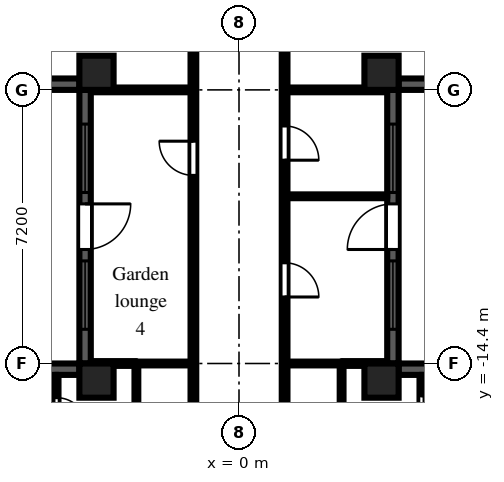
"""IFC4 building model, lengths in metres.
Left out: names, types, materials, properties, quantities, classifications, styles, units other than length and angle.
Written with IfcOpenShell. Run it as: python <this file> out.ifc"""

import sys

from ifc_helpers import new_model, si_unit, direction, frame, frame_2d, origin, origin_2d, place, context, subcontext, project, spatial, rectangle, extrude, element, fill, save


model = new_model("IFC4")
c1 = context("Model", 3, precision=1e-05, world=origin(), true_north=direction((0.0, 1.0)))
c2 = subcontext(c1, "Body", "Model", "MODEL_VIEW")
j1 = project(units=[si_unit("LENGTHUNIT", "METRE"), si_unit("PLANEANGLEUNIT", "RADIAN")], contexts=[c1])
p1 = place(None, origin())
s1 = spatial("IfcSite", under=j1, at=p1, CompositionType="ELEMENT")
p2 = place(p1, origin())
s2 = spatial("IfcBuilding", under=s1, at=p2, CompositionType="ELEMENT")
p3 = place(p2, frame((0.0, 0.0, 93.9)))
s3 = spatial("IfcBuildingStorey", under=s2, at=p3, CompositionType="ELEMENT", Elevation=93.9)
for number, where, z_axis, x_axis in (
    (1, (-3.75, -14.85, 0.0), (0.0, 0.0, 1.0), (1.0, 0.0, 0.0)),
    (2, (-3.75, -6.75, 0.0), (0.0, 0.0, 1.0), (1.0, 0.0, 0.0)),
    (3, (3.75, -14.85, 0.0), (0.0, 0.0, 1.0), (1.0, 0.0, 0.0)),
    (4, (3.75, -6.75, 0.0), (0.0, 0.0, 1.0), (1.0, 0.0, 0.0)),
):
    element("IfcColumn", number, at=place(p3, frame(where, z_axis=z_axis, x_axis=x_axis)), inside=s3, PredefinedType="COLUMN", context=c2, shape_type="SweptSolid", body=[
        extrude(rectangle(XDim=0.9, YDim=0.9, at=origin_2d()), origin(), (0.0, 0.0, 1.0), 3.0),
    ])
p4 = place(p3, frame((-7.2, -7.05, 0.0), z_axis=(0.0, 0.0, 1.0), x_axis=(1.0, 0.0, 0.0)))
e5 = element("IfcWall", 5, at=p4, inside=s3, PredefinedType="SOLIDWALL", context=c2, shape_type="SweptSolid", body=[
    extrude(rectangle(XDim=3.0, YDim=0.3, at=frame_2d((1.5, 0.0))), origin(), (0.0, 0.0, 1.0), 2.1),
])
p5 = place(p3, frame((-4.05, -7.2, 0.0), z_axis=(0.0, 0.0, 1.0), x_axis=(0.0, -1.0, 0.0)))
e6 = element("IfcWall", 6, at=p5, inside=s3, PredefinedType="SOLIDWALL", context=c2, shape_type="SweptSolid", body=[
    extrude(rectangle(XDim=7.2, YDim=0.3, at=frame_2d((3.6, 0.0))), origin(), (0.0, 0.0, 1.0), 2.1),
])
p6 = place(p5, frame((3.0, 0.0, 0.0)))
e7 = element("IfcOpeningElement", 7, at=p6, cuts=e6, PredefinedType="OPENING", context=c2, shape_type="SweptSolid", body=[
    extrude(rectangle(XDim=1.2, YDim=2.05, at=frame_2d((0.6, 1.025))), frame((0.0, 0.16, 0.0), z_axis=(0.0, -1.0, 0.0), x_axis=(1.0, 0.0, 0.0)), (0.0, 0.0, 1.0), 0.32),
])
p7 = place(p5, frame((0.9, 0.0, 0.2)))
e8 = element("IfcOpeningElement", 8, at=p7, cuts=e6, PredefinedType="OPENING", context=c2, shape_type="SweptSolid", body=[
    extrude(rectangle(XDim=1.8, YDim=1.85, at=frame_2d((0.9, 0.925))), frame((0.0, 0.16, 0.0), z_axis=(0.0, -1.0, 0.0), x_axis=(1.0, 0.0, 0.0)), (0.0, 0.0, 1.0), 0.32),
])
p8 = place(p5, frame((4.5, 0.0, 0.2)))
e9 = element("IfcOpeningElement", 9, at=p8, cuts=e6, PredefinedType="OPENING", context=c2, shape_type="SweptSolid", body=[
    extrude(rectangle(XDim=1.8, YDim=1.85, at=frame_2d((0.9, 0.925))), frame((0.0, 0.16, 0.0), z_axis=(0.0, -1.0, 0.0), x_axis=(1.0, 0.0, 0.0)), (0.0, 0.0, 1.0), 0.32),
])
for number, where, z_axis, x_axis in (
    (10, (-4.2, -14.55, 0.0), (0.0, 0.0, 1.0), (-1.0, 0.0, 0.0)),
    (11, (6.3, -14.55, 0.0), (0.0, 0.0, 1.0), (-1.0, 0.0, 0.0)),
):
    element("IfcWall", number, at=place(p3, frame(where, z_axis=z_axis, x_axis=x_axis)), inside=s3, PredefinedType="SOLIDWALL", context=c2, shape_type="SweptSolid", body=[
        extrude(rectangle(XDim=2.1, YDim=0.3, at=frame_2d((1.05, 0.0))), origin(), (0.0, 0.0, 1.0), 2.1),
    ])
p9 = place(p3, frame((4.05, -14.4, 0.0), z_axis=(0.0, 0.0, 1.0), x_axis=(0.0, 1.0, 0.0)))
e12 = element("IfcWall", 12, at=p9, inside=s3, PredefinedType="SOLIDWALL", context=c2, shape_type="SweptSolid", body=[
    extrude(rectangle(XDim=7.2, YDim=0.3, at=frame_2d((3.6, 0.0))), origin(), (0.0, 0.0, 1.0), 2.1),
])
p10 = place(p9, frame((3.0, 0.0, 0.0)))
e13 = element("IfcOpeningElement", 13, at=p10, cuts=e12, PredefinedType="OPENING", context=c2, shape_type="SweptSolid", body=[
    extrude(rectangle(XDim=1.2, YDim=2.05, at=frame_2d((0.6, 1.025))), frame((0.0, 0.16, 0.0), z_axis=(0.0, -1.0, 0.0), x_axis=(1.0, 0.0, 0.0)), (0.0, 0.0, 1.0), 0.32),
])
p11 = place(p9, frame((0.9, 0.0, 0.2)))
e14 = element("IfcOpeningElement", 14, at=p11, cuts=e12, PredefinedType="OPENING", context=c2, shape_type="SweptSolid", body=[
    extrude(rectangle(XDim=1.8, YDim=1.85, at=frame_2d((0.9, 0.925))), frame((0.0, 0.16, 0.0), z_axis=(0.0, -1.0, 0.0), x_axis=(1.0, 0.0, 0.0)), (0.0, 0.0, 1.0), 0.32),
])
p12 = place(p9, frame((4.5, 0.0, 0.2)))
e15 = element("IfcOpeningElement", 15, at=p12, cuts=e12, PredefinedType="OPENING", context=c2, shape_type="SweptSolid", body=[
    extrude(rectangle(XDim=1.8, YDim=1.85, at=frame_2d((0.9, 0.925))), frame((0.0, 0.16, 0.0), z_axis=(0.0, -1.0, 0.0), x_axis=(1.0, 0.0, 0.0)), (0.0, 0.0, 1.0), 0.32),
])
p13 = place(p3, frame((4.2, -7.05, 0.0), z_axis=(0.0, 0.0, 1.0), x_axis=(1.0, 0.0, 0.0)))
e16 = element("IfcWall", 16, at=p13, inside=s3, PredefinedType="SOLIDWALL", context=c2, shape_type="SweptSolid", body=[
    extrude(rectangle(XDim=3.0, YDim=0.3, at=frame_2d((1.5, 0.0))), origin(), (0.0, 0.0, 1.0), 2.1),
])
p14 = place(p3, frame((-4.8, -16.25, 0.0), z_axis=(0.0, 0.0, 1.0), x_axis=(0.0, 1.0, 0.0)))
e17 = element("IfcWall", 17, at=p14, inside=s3, PredefinedType="PARTITIONING", context=c2, shape_type="SweptSolid", body=[
    extrude(rectangle(XDim=1.55, YDim=0.1, at=frame_2d((0.775, 0.0))), origin(), (0.0, 0.0, 1.0), 2.575),
])
p15 = place(p14, frame((0.15, 0.0, 0.0)))
e18 = element("IfcOpeningElement", 18, at=p15, cuts=e17, PredefinedType="OPENING", context=c2, shape_type="SweptSolid", body=[
    extrude(rectangle(XDim=0.8, YDim=2.1, at=frame_2d((0.4, 1.05))), frame((0.0, 0.06, 0.0), z_axis=(0.0, -1.0, 0.0), x_axis=(1.0, 0.0, 0.0)), (0.0, 0.0, 1.0), 0.12),
])
p16 = place(p3, frame((-3.9, -14.4, 0.0), z_axis=(0.0, 0.0, 1.0), x_axis=(1.0, 0.0, 0.0)))
e19 = element("IfcWall", 19, at=p16, inside=s3, PredefinedType="PARTITIONING", context=c2, shape_type="SweptSolid", body=[
    extrude(rectangle(XDim=1.2, YDim=0.125, at=frame_2d((0.6, 0.0))), origin(), (0.0, 0.0, 1.0), 2.575),
])
p17 = place(p3, frame((-3.9, -7.2, 0.0), z_axis=(0.0, 0.0, 1.0), x_axis=(1.0, 0.0, 0.0)))
e20 = element("IfcWall", 20, at=p17, inside=s3, PredefinedType="PARTITIONING", context=c2, shape_type="SweptSolid", body=[
    extrude(rectangle(XDim=2.625, YDim=0.125, at=frame_2d((1.312, 0.0))), origin(), (0.0, 0.0, 1.0), 2.575),
])
p18 = place(p3, frame((-2.7, -32.35, 0.0), z_axis=(0.0, 0.0, 1.0), x_axis=(0.0, 1.0, 0.0)))
e21 = element("IfcWall", 21, at=p18, inside=s3, PredefinedType="PARTITIONING", context=c2, shape_type="SweptSolid", body=[
    extrude(rectangle(XDim=17.888, YDim=0.1, at=frame_2d((8.944, 0.0))), origin(), (0.0, 0.0, 1.0), 2.575),
])
p19 = place(p18, frame((2.2, 0.0, 0.0)))
e22 = element("IfcOpeningElement", 22, at=p19, cuts=e21, PredefinedType="OPENING", context=c2, shape_type="SweptSolid", body=[
    extrude(rectangle(XDim=0.9, YDim=2.1, at=frame_2d((0.45, 1.05))), frame((0.0, 0.06, 0.0), z_axis=(0.0, -1.0, 0.0), x_axis=(1.0, 0.0, 0.0)), (0.0, 0.0, 1.0), 0.12),
])
p20 = place(p18, frame((4.0, 0.0, 0.0)))
e23 = element("IfcOpeningElement", 23, at=p20, cuts=e21, PredefinedType="OPENING", context=c2, shape_type="SweptSolid", body=[
    extrude(rectangle(XDim=0.9, YDim=2.1, at=frame_2d((0.45, 1.05))), frame((0.0, 0.06, 0.0), z_axis=(0.0, -1.0, 0.0), x_axis=(1.0, 0.0, 0.0)), (0.0, 0.0, 1.0), 0.12),
])
p21 = place(p18, frame((9.4, 0.0, 0.0)))
e24 = element("IfcOpeningElement", 24, at=p21, cuts=e21, PredefinedType="OPENING", context=c2, shape_type="SweptSolid", body=[
    extrude(rectangle(XDim=0.9, YDim=2.1, at=frame_2d((0.45, 1.05))), frame((0.0, 0.06, 0.0), z_axis=(0.0, -1.0, 0.0), x_axis=(1.0, 0.0, 0.0)), (0.0, 0.0, 1.0), 0.12),
])
p22 = place(p18, frame((11.2, 0.0, 0.0)))
e25 = element("IfcOpeningElement", 25, at=p22, cuts=e21, PredefinedType="OPENING", context=c2, shape_type="SweptSolid", body=[
    extrude(rectangle(XDim=0.9, YDim=2.1, at=frame_2d((0.45, 1.05))), frame((0.0, 0.06, 0.0), z_axis=(0.0, -1.0, 0.0), x_axis=(1.0, 0.0, 0.0)), (0.0, 0.0, 1.0), 0.12),
])
p23 = place(p18, frame((14.8, 0.0, 0.0)))
e26 = element("IfcOpeningElement", 26, at=p23, cuts=e21, PredefinedType="OPENING", context=c2, shape_type="SweptSolid", body=[
    extrude(rectangle(XDim=0.9, YDim=2.1, at=frame_2d((0.45, 1.05))), frame((0.0, 0.06, 0.0), z_axis=(0.0, -1.0, 0.0), x_axis=(1.0, 0.0, 0.0)), (0.0, 0.0, 1.0), 0.12),
])
p24 = place(p3, frame((-2.7, -14.4, 0.0), z_axis=(0.0, 0.0, 1.0), x_axis=(1.0, 0.0, 0.0)))
e27 = element("IfcWall", 27, at=p24, inside=s3, PredefinedType="PARTITIONING", context=c2, shape_type="SweptSolid", body=[
    extrude(rectangle(XDim=1.425, YDim=0.1, at=frame_2d((0.712, 0.0))), origin(), (0.0, 0.0, 1.0), 2.575),
])
p25 = place(p3, frame((-1.2, -36.5, 0.0), z_axis=(0.0, 0.0, 1.0), x_axis=(0.0, 1.0, 0.0)))
e28 = element("IfcWall", 28, at=p25, inside=s3, PredefinedType="PARTITIONING", context=c2, shape_type="SweptSolid", body=[
    extrude(rectangle(XDim=35.225, YDim=0.15, at=frame_2d((17.613, 0.0))), origin(), (0.0, 0.0, 1.0), 2.575),
])
p26 = place(p25, frame((31.85, 0.0, 0.0)))
e29 = element("IfcOpeningElement", 29, at=p26, cuts=e28, PredefinedType="OPENING", context=c2, shape_type="SweptSolid", body=[
    extrude(rectangle(XDim=0.9, YDim=2.1, at=frame_2d((0.45, 1.05))), frame((0.0, 0.085, 0.0), z_axis=(0.0, -1.0, 0.0), x_axis=(1.0, 0.0, 0.0)), (0.0, 0.0, 1.0), 0.17),
])
p27 = place(p25, frame((27.05, 0.0, 0.0)))
e30 = element("IfcOpeningElement", 30, at=p27, cuts=e28, PredefinedType="OPENING", context=c2, shape_type="SweptSolid", body=[
    extrude(rectangle(XDim=0.9, YDim=2.1, at=frame_2d((0.45, 1.05))), frame((0.0, 0.085, 0.0), z_axis=(0.0, -1.0, 0.0), x_axis=(1.0, 0.0, 0.0)), (0.0, 0.0, 1.0), 0.17),
])
p28 = place(p25, frame((1.55, 0.0, 0.0)))
e31 = element("IfcOpeningElement", 31, at=p28, cuts=e28, PredefinedType="OPENING", context=c2, shape_type="SweptSolid", body=[
    extrude(rectangle(XDim=1.0, YDim=2.1, at=frame_2d((0.5, 1.05))), frame((0.0, 0.085, 0.0), z_axis=(0.0, -1.0, 0.0), x_axis=(1.0, 0.0, 0.0)), (0.0, 0.0, 1.0), 0.17),
])
p29 = place(p3, frame((1.2, -36.5, 0.0), z_axis=(0.0, 0.0, 1.0), x_axis=(0.0, 1.0, 0.0)))
e32 = element("IfcWall", 32, at=p29, inside=s3, PredefinedType="PARTITIONING", context=c2, shape_type="SweptSolid", body=[
    extrude(rectangle(XDim=35.375, YDim=0.15, at=frame_2d((17.688, 0.0))), origin(), (0.0, 0.0, 1.0), 2.575),
])
p30 = place(p29, frame((33.65, 0.0, 0.0)))
e33 = element("IfcOpeningElement", 33, at=p30, cuts=e32, PredefinedType="OPENING", context=c2, shape_type="SweptSolid", body=[
    extrude(rectangle(XDim=0.9, YDim=2.1, at=frame_2d((0.45, 1.05))), frame((0.0, 0.085, 0.0), z_axis=(0.0, -1.0, 0.0), x_axis=(1.0, 0.0, 0.0)), (0.0, 0.0, 1.0), 0.17),
])
p31 = place(p29, frame((30.65, 0.0, 0.0)))
e34 = element("IfcOpeningElement", 34, at=p31, cuts=e32, PredefinedType="OPENING", context=c2, shape_type="SweptSolid", body=[
    extrude(rectangle(XDim=0.9, YDim=2.1, at=frame_2d((0.45, 1.05))), frame((0.0, 0.085, 0.0), z_axis=(0.0, -1.0, 0.0), x_axis=(1.0, 0.0, 0.0)), (0.0, 0.0, 1.0), 0.17),
])
p32 = place(p29, frame((27.45, 0.0, 0.0)))
e35 = element("IfcOpeningElement", 35, at=p32, cuts=e32, PredefinedType="OPENING", context=c2, shape_type="SweptSolid", body=[
    extrude(rectangle(XDim=0.9, YDim=2.1, at=frame_2d((0.45, 1.05))), frame((0.0, 0.085, 0.0), z_axis=(0.0, -1.0, 0.0), x_axis=(1.0, 0.0, 0.0)), (0.0, 0.0, 1.0), 0.17),
])
p33 = place(p29, frame((23.85, 0.0, 0.0)))
e36 = element("IfcOpeningElement", 36, at=p33, cuts=e32, PredefinedType="OPENING", context=c2, shape_type="SweptSolid", body=[
    extrude(rectangle(XDim=0.9, YDim=2.1, at=frame_2d((0.45, 1.05))), frame((0.0, 0.085, 0.0), z_axis=(0.0, -1.0, 0.0), x_axis=(1.0, 0.0, 0.0)), (0.0, 0.0, 1.0), 0.17),
])
p34 = place(p29, frame((1.55, 0.0, 0.0)))
e37 = element("IfcOpeningElement", 37, at=p34, cuts=e32, PredefinedType="OPENING", context=c2, shape_type="SweptSolid", body=[
    extrude(rectangle(XDim=1.0, YDim=2.1, at=frame_2d((0.5, 1.05))), frame((0.0, 0.085, 0.0), z_axis=(0.0, -1.0, 0.0), x_axis=(1.0, 0.0, 0.0)), (0.0, 0.0, 1.0), 0.17),
])
p35 = place(p3, frame((1.275, -14.4, 0.0), z_axis=(0.0, 0.0, 1.0), x_axis=(1.0, 0.0, 0.0)))
e38 = element("IfcWall", 38, at=p35, inside=s3, PredefinedType="PARTITIONING", context=c2, shape_type="SweptSolid", body=[
    extrude(rectangle(XDim=1.425, YDim=0.1, at=frame_2d((0.712, 0.0))), origin(), (0.0, 0.0, 1.0), 2.575),
])
p36 = place(p3, frame((1.275, -10.0, 0.0), z_axis=(0.0, 0.0, 1.0), x_axis=(1.0, 0.0, 0.0)))
e39 = element("IfcWall", 39, at=p36, inside=s3, PredefinedType="PARTITIONING", context=c2, shape_type="SweptSolid", body=[
    extrude(rectangle(XDim=2.625, YDim=0.1, at=frame_2d((1.312, 0.0))), origin(), (0.0, 0.0, 1.0), 2.575),
])
p37 = place(p3, frame((1.275, -7.2, 0.0), z_axis=(0.0, 0.0, 1.0), x_axis=(1.0, 0.0, 0.0)))
e40 = element("IfcWall", 40, at=p37, inside=s3, PredefinedType="PARTITIONING", context=c2, shape_type="SweptSolid", body=[
    extrude(rectangle(XDim=2.625, YDim=0.125, at=frame_2d((1.312, 0.0))), origin(), (0.0, 0.0, 1.0), 2.575),
])
p38 = place(p3, frame((2.7, -32.35, 0.0), z_axis=(0.0, 0.0, 1.0), x_axis=(0.0, 1.0, 0.0)))
e41 = element("IfcWall", 41, at=p38, inside=s3, PredefinedType="PARTITIONING", context=c2, shape_type="SweptSolid", body=[
    extrude(rectangle(XDim=17.888, YDim=0.1, at=frame_2d((8.944, 0.0))), origin(), (0.0, 0.0, 1.0), 2.575),
])
p39 = place(p38, frame((2.2, 0.0, 0.0)))
e42 = element("IfcOpeningElement", 42, at=p39, cuts=e41, PredefinedType="OPENING", context=c2, shape_type="SweptSolid", body=[
    extrude(rectangle(XDim=0.9, YDim=2.1, at=frame_2d((0.45, 1.05))), frame((0.0, 0.06, 0.0), z_axis=(0.0, -1.0, 0.0), x_axis=(1.0, 0.0, 0.0)), (0.0, 0.0, 1.0), 0.12),
])
p40 = place(p38, frame((4.0, 0.0, 0.0)))
e43 = element("IfcOpeningElement", 43, at=p40, cuts=e41, PredefinedType="OPENING", context=c2, shape_type="SweptSolid", body=[
    extrude(rectangle(XDim=0.9, YDim=2.1, at=frame_2d((0.45, 1.05))), frame((0.0, 0.06, 0.0), z_axis=(0.0, -1.0, 0.0), x_axis=(1.0, 0.0, 0.0)), (0.0, 0.0, 1.0), 0.12),
])
p41 = place(p38, frame((9.4, 0.0, 0.0)))
e44 = element("IfcOpeningElement", 44, at=p41, cuts=e41, PredefinedType="OPENING", context=c2, shape_type="SweptSolid", body=[
    extrude(rectangle(XDim=0.9, YDim=2.1, at=frame_2d((0.45, 1.05))), frame((0.0, 0.06, 0.0), z_axis=(0.0, -1.0, 0.0), x_axis=(1.0, 0.0, 0.0)), (0.0, 0.0, 1.0), 0.12),
])
p42 = place(p38, frame((11.2, 0.0, 0.0)))
e45 = element("IfcOpeningElement", 45, at=p42, cuts=e41, PredefinedType="OPENING", context=c2, shape_type="SweptSolid", body=[
    extrude(rectangle(XDim=0.9, YDim=2.1, at=frame_2d((0.45, 1.05))), frame((0.0, 0.06, 0.0), z_axis=(0.0, -1.0, 0.0), x_axis=(1.0, 0.0, 0.0)), (0.0, 0.0, 1.0), 0.12),
])
p43 = place(p38, frame((14.8, 0.0, 0.0)))
e46 = element("IfcOpeningElement", 46, at=p43, cuts=e41, PredefinedType="OPENING", context=c2, shape_type="SweptSolid", body=[
    extrude(rectangle(XDim=0.9, YDim=2.1, at=frame_2d((0.45, 1.05))), frame((0.0, 0.06, 0.0), z_axis=(0.0, -1.0, 0.0), x_axis=(1.0, 0.0, 0.0)), (0.0, 0.0, 1.0), 0.12),
])
p44 = place(p3, frame((2.7, -14.4, 0.0), z_axis=(0.0, 0.0, 1.0), x_axis=(1.0, 0.0, 0.0)))
e47 = element("IfcWall", 47, at=p44, inside=s3, PredefinedType="PARTITIONING", context=c2, shape_type="SweptSolid", body=[
    extrude(rectangle(XDim=1.2, YDim=0.125, at=frame_2d((0.6, 0.0))), origin(), (0.0, 0.0, 1.0), 2.575),
])
p45 = place(p3, frame((4.8, -16.15, 0.0), z_axis=(0.0, 0.0, 1.0), x_axis=(0.0, 1.0, 0.0)))
e48 = element("IfcWall", 48, at=p45, inside=s3, PredefinedType="PARTITIONING", context=c2, shape_type="SweptSolid", body=[
    extrude(rectangle(XDim=1.45, YDim=0.1, at=frame_2d((0.725, 0.0))), origin(), (0.0, 0.0, 1.0), 2.575),
])
p46 = place(p45, frame((0.1, 0.0, 0.0)))
e49 = element("IfcOpeningElement", 49, at=p46, cuts=e48, PredefinedType="OPENING", context=c2, shape_type="SweptSolid", body=[
    extrude(rectangle(XDim=0.8, YDim=2.1, at=frame_2d((0.4, 1.05))), frame((0.0, 0.06, 0.0), z_axis=(0.0, -1.0, 0.0), x_axis=(1.0, 0.0, 0.0)), (0.0, 0.0, 1.0), 0.12),
])
p47 = place(p6, origin())
e50 = element("IfcDoor", 50, at=p47, inside=s3, OperationType="SINGLE_SWING_LEFT", PredefinedType="DOOR", context=c2, shape_type="SweptSolid", body=[
    extrude(rectangle(XDim=1.2, YDim=2.05, at=frame_2d((0.6, 1.025))), frame((0.0, 0.025, 0.0), z_axis=(0.0, -1.0, 0.0), x_axis=(1.0, 0.0, 0.0)), (0.0, 0.0, 1.0), 0.05),
])
fill(e7, e50)
p48 = place(p7, origin())
e51 = element("IfcWindow", 51, at=p48, inside=s3, PartitioningType="SINGLE_PANEL", PredefinedType="WINDOW", context=c2, shape_type="SweptSolid", body=[
    extrude(rectangle(XDim=1.8, YDim=1.85, at=frame_2d((0.9, 0.925))), frame((0.0, 0.03, 0.0), z_axis=(0.0, -1.0, 0.0), x_axis=(1.0, 0.0, 0.0)), (0.0, 0.0, 1.0), 0.06),
])
fill(e8, e51)
p49 = place(p8, origin())
e52 = element("IfcWindow", 52, at=p49, inside=s3, PartitioningType="SINGLE_PANEL", PredefinedType="WINDOW", context=c2, shape_type="SweptSolid", body=[
    extrude(rectangle(XDim=1.8, YDim=1.85, at=frame_2d((0.9, 0.925))), frame((0.0, 0.03, 0.0), z_axis=(0.0, -1.0, 0.0), x_axis=(1.0, 0.0, 0.0)), (0.0, 0.0, 1.0), 0.06),
])
fill(e9, e52)
p50 = place(p10, origin())
e53 = element("IfcDoor", 53, at=p50, inside=s3, OperationType="SINGLE_SWING_LEFT", PredefinedType="DOOR", context=c2, shape_type="SweptSolid", body=[
    extrude(rectangle(XDim=1.2, YDim=2.05, at=frame_2d((0.6, 1.025))), frame((0.0, 0.025, 0.0), z_axis=(0.0, -1.0, 0.0), x_axis=(1.0, 0.0, 0.0)), (0.0, 0.0, 1.0), 0.05),
])
fill(e13, e53)
p51 = place(p11, origin())
e54 = element("IfcWindow", 54, at=p51, inside=s3, PartitioningType="SINGLE_PANEL", PredefinedType="WINDOW", context=c2, shape_type="SweptSolid", body=[
    extrude(rectangle(XDim=1.8, YDim=1.85, at=frame_2d((0.9, 0.925))), frame((0.0, 0.03, 0.0), z_axis=(0.0, -1.0, 0.0), x_axis=(1.0, 0.0, 0.0)), (0.0, 0.0, 1.0), 0.06),
])
fill(e14, e54)
p52 = place(p12, origin())
e55 = element("IfcWindow", 55, at=p52, inside=s3, PartitioningType="SINGLE_PANEL", PredefinedType="WINDOW", context=c2, shape_type="SweptSolid", body=[
    extrude(rectangle(XDim=1.8, YDim=1.85, at=frame_2d((0.9, 0.925))), frame((0.0, 0.03, 0.0), z_axis=(0.0, -1.0, 0.0), x_axis=(1.0, 0.0, 0.0)), (0.0, 0.0, 1.0), 0.06),
])
fill(e15, e55)
p53 = place(p32, frame((0.9, 0.0, 0.0), z_axis=(0.0, 0.0, 1.0), x_axis=(-1.0, 0.0, 0.0)))
e56 = element("IfcDoor", 56, at=p53, inside=s3, OperationType="SINGLE_SWING_RIGHT", PredefinedType="DOOR", context=c2, shape_type="SweptSolid", body=[
    extrude(rectangle(XDim=0.9, YDim=2.1, at=frame_2d((0.45, 1.05))), frame((0.0, 0.025, 0.0), z_axis=(0.0, -1.0, 0.0), x_axis=(1.0, 0.0, 0.0)), (0.0, 0.0, 1.0), 0.05),
])
fill(e35, e56)
p54 = place(p33, frame((0.9, 0.0, 0.0), z_axis=(0.0, 0.0, 1.0), x_axis=(-1.0, 0.0, 0.0)))
e57 = element("IfcDoor", 57, at=p54, inside=s3, OperationType="SINGLE_SWING_RIGHT", PredefinedType="DOOR", context=c2, shape_type="SweptSolid", body=[
    extrude(rectangle(XDim=0.9, YDim=2.1, at=frame_2d((0.45, 1.05))), frame((0.0, 0.025, 0.0), z_axis=(0.0, -1.0, 0.0), x_axis=(1.0, 0.0, 0.0)), (0.0, 0.0, 1.0), 0.05),
])
fill(e36, e57)
p55 = place(p46, frame((0.8, 0.0, 0.0), z_axis=(0.0, 0.0, 1.0), x_axis=(-1.0, 0.0, 0.0)))
e58 = element("IfcDoor", 58, at=p55, inside=s3, OperationType="SINGLE_SWING_LEFT", PredefinedType="DOOR", context=c2, shape_type="SweptSolid", body=[
    extrude(rectangle(XDim=0.8, YDim=2.1, at=frame_2d((0.4, 1.05))), frame((0.0, 0.025, 0.0), z_axis=(0.0, -1.0, 0.0), x_axis=(1.0, 0.0, 0.0)), (0.0, 0.0, 1.0), 0.05),
])
fill(e49, e58)
p56 = place(p27, origin())
e59 = element("IfcDoor", 59, at=p56, inside=s3, OperationType="SINGLE_SWING_RIGHT", PredefinedType="DOOR", context=c2, shape_type="SweptSolid", body=[
    extrude(rectangle(XDim=0.9, YDim=2.1, at=frame_2d((0.45, 1.05))), frame((0.0, 0.025, 0.0), z_axis=(0.0, -1.0, 0.0), x_axis=(1.0, 0.0, 0.0)), (0.0, 0.0, 1.0), 0.05),
])
fill(e30, e59)
p57 = place(p15, frame((0.8, 0.0, 0.0), z_axis=(0.0, 0.0, 1.0), x_axis=(-1.0, 0.0, 0.0)))
e60 = element("IfcDoor", 60, at=p57, inside=s3, OperationType="SINGLE_SWING_RIGHT", PredefinedType="DOOR", context=c2, shape_type="SweptSolid", body=[
    extrude(rectangle(XDim=0.8, YDim=2.1, at=frame_2d((0.4, 1.05))), frame((0.0, 0.025, 0.0), z_axis=(0.0, -1.0, 0.0), x_axis=(1.0, 0.0, 0.0)), (0.0, 0.0, 1.0), 0.05),
])
fill(e18, e60)
save(model, sys.argv[1])
